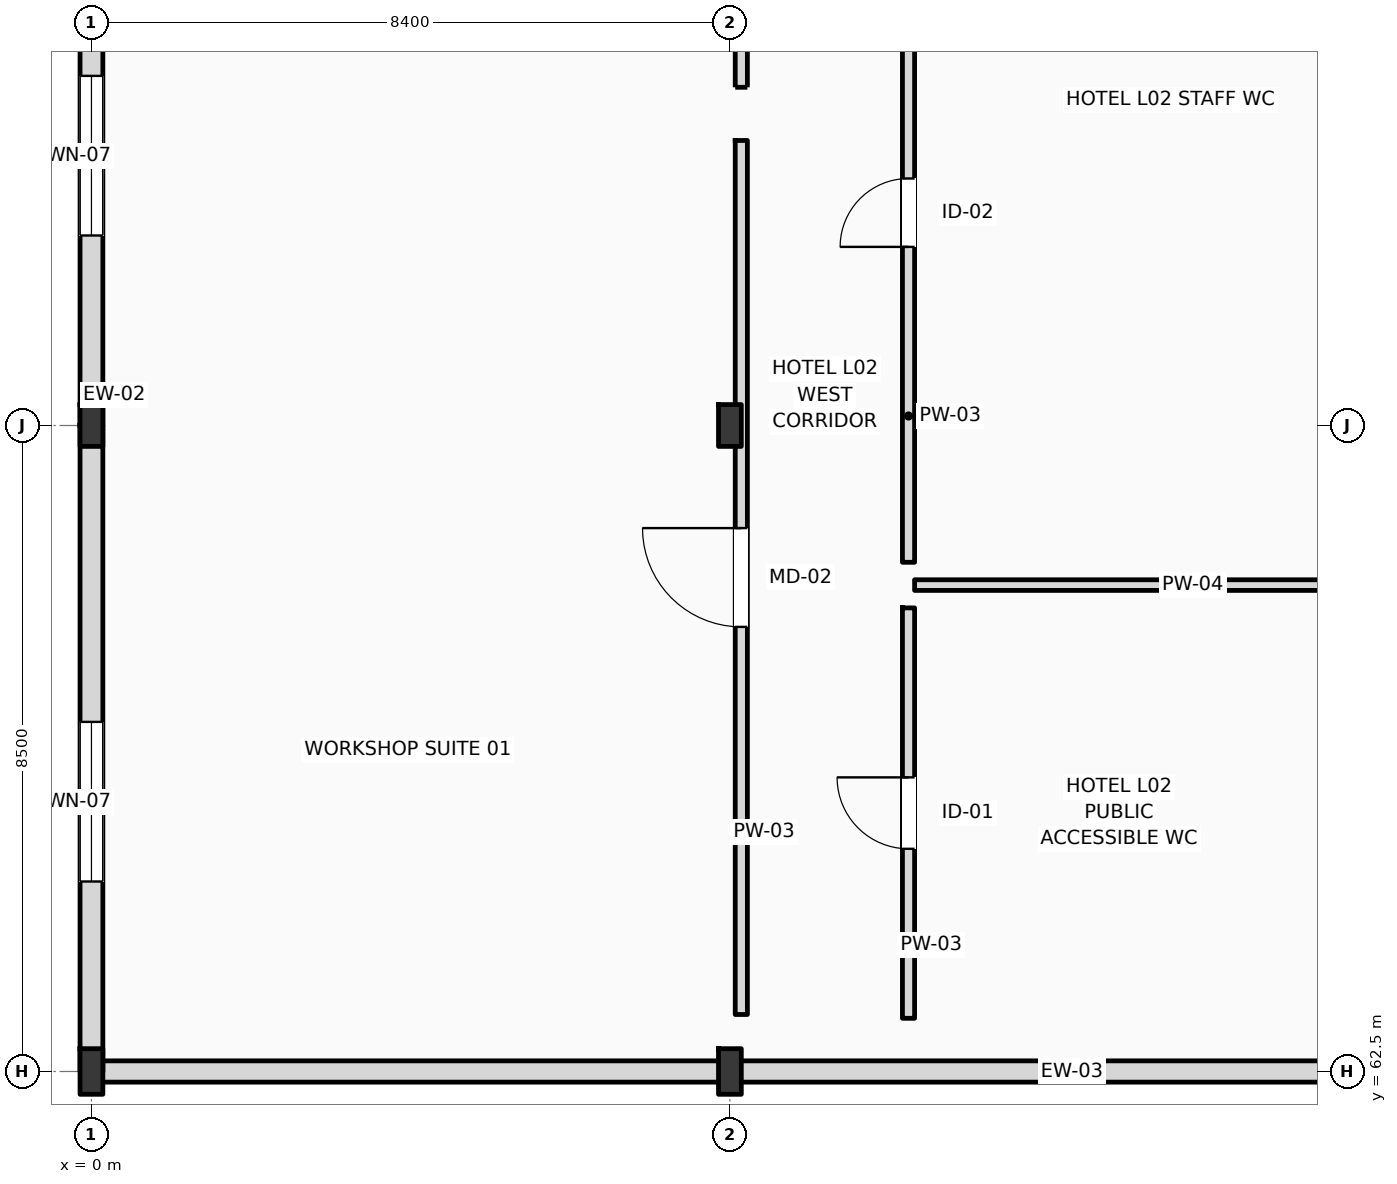
"""IFC4 building model, lengths in metres.
Left out: names, types, materials, properties, quantities, classifications, styles, units other than length and angle.
Written with IfcOpenShell. Run it as: python <this file> out.ifc"""

import sys

from ifc_helpers import new_model, si_unit, direction, frame, frame_2d, origin, origin_2d, place, context, subcontext, project, spatial, rectangle, i_section, extrude, element, fill, save


model = new_model("IFC4")
c1 = context("Model", 3, precision=1e-05, world=origin(), true_north=direction((0.0, 1.0)))
c2 = subcontext(c1, "Body", "Model", "MODEL_VIEW")
j1 = project(units=[si_unit("LENGTHUNIT", "METRE"), si_unit("PLANEANGLEUNIT", "RADIAN")], contexts=[c1])
p1 = place(None, origin())
s1 = spatial("IfcSite", under=j1, at=p1, CompositionType="ELEMENT")
p2 = place(p1, origin())
s2 = spatial("IfcBuilding", under=s1, at=p2, CompositionType="ELEMENT")
p3 = place(p2, frame((0.0, 0.0, 11.4)))
s3 = spatial("IfcBuildingStorey", under=s2, at=p3, CompositionType="ELEMENT", Elevation=11.4)
p4 = place(p3, frame((0.0, 62.5, 0.0), z_axis=(0.0, 0.0, 1.0), x_axis=(1.0, 0.0, 0.0)))
e1 = element("IfcColumn", 1, at=p4, inside=s3, PredefinedType="COLUMN", context=c2, shape_type="SweptSolid", body=[
    extrude(i_section(OverallWidth=0.3, OverallDepth=0.6, WebThickness=0.015, FlangeThickness=0.03, FilletRadius=0.027, at=origin_2d()), origin(), (0.0, 0.0, 1.0), 4.8),
])
p5 = place(p3, frame((0.0, 71.0, 0.0), z_axis=(0.0, 0.0, 1.0), x_axis=(1.0, 0.0, 0.0)))
e2 = element("IfcColumn", 2, at=p5, inside=s3, PredefinedType="COLUMN", context=c2, shape_type="SweptSolid", body=[
    extrude(i_section(OverallWidth=0.3, OverallDepth=0.55, WebThickness=0.015, FlangeThickness=0.029, FilletRadius=0.027, at=origin_2d()), origin(), (0.0, 0.0, 1.0), 4.8),
])
p6 = place(p3, frame((8.4, 62.5, 0.0), z_axis=(0.0, 0.0, 1.0), x_axis=(1.0, 0.0, 0.0)))
e3 = element("IfcColumn", 3, at=p6, inside=s3, PredefinedType="COLUMN", context=c2, shape_type="SweptSolid", body=[
    extrude(i_section(OverallWidth=0.3, OverallDepth=0.6, WebThickness=0.015, FlangeThickness=0.03, FilletRadius=0.027, at=origin_2d()), origin(), (0.0, 0.0, 1.0), 4.8),
])
p7 = place(p3, frame((8.4, 71.0, 0.0), z_axis=(0.0, 0.0, 1.0), x_axis=(1.0, 0.0, 0.0)))
e4 = element("IfcColumn", 4, at=p7, inside=s3, PredefinedType="COLUMN", context=c2, shape_type="SweptSolid", body=[
    extrude(i_section(OverallWidth=0.3, OverallDepth=0.55, WebThickness=0.015, FlangeThickness=0.029, FilletRadius=0.027, at=origin_2d()), origin(), (0.0, 0.0, 1.0), 4.8),
])
p8 = place(p3, frame((0.0, 62.5, 0.0), z_axis=(0.0, 0.0, 1.0), x_axis=(0.0, 1.0, 0.0)))
e5 = element("IfcWall", 5, at=p8, inside=s3, PredefinedType="STANDARD", context=c2, shape_type="SweptSolid", body=[
    extrude(rectangle(XDim=8.5, YDim=0.3, at=frame_2d((4.25, 0.0))), origin(), (0.0, 0.0, 1.0), 4.11),
])
p9 = place(p8, frame((2.5, 0.0, 0.95)))
e6 = element("IfcOpeningElement", 6, at=p9, cuts=e5, PredefinedType="OPENING", context=c2, shape_type="SweptSolid", body=[
    extrude(rectangle(XDim=2.1, YDim=2.2, at=frame_2d((1.05, 1.1))), frame((0.0, 0.16, 0.0), z_axis=(0.0, -1.0, 0.0), x_axis=(1.0, 0.0, 0.0)), (0.0, 0.0, 1.0), 0.32),
])
p10 = place(p3, frame((0.0, 71.0, 0.0), z_axis=(0.0, 0.0, 1.0), x_axis=(0.0, 1.0, 0.0)))
e7 = element("IfcWall", 7, at=p10, inside=s3, PredefinedType="STANDARD", context=c2, shape_type="SweptSolid", body=[
    extrude(rectangle(XDim=8.5, YDim=0.3, at=frame_2d((4.25, 0.0))), origin(), (0.0, 0.0, 1.0), 4.11),
])
p11 = place(p10, frame((2.5, 0.0, 0.95)))
e8 = element("IfcOpeningElement", 8, at=p11, cuts=e7, PredefinedType="OPENING", context=c2, shape_type="SweptSolid", body=[
    extrude(rectangle(XDim=2.1, YDim=2.2, at=frame_2d((1.05, 1.1))), frame((0.0, 0.16, 0.0), z_axis=(0.0, -1.0, 0.0), x_axis=(1.0, 0.0, 0.0)), (0.0, 0.0, 1.0), 0.32),
])
p12 = place(p3, frame((0.0, 62.5, 0.0), z_axis=(0.0, 0.0, 1.0), x_axis=(1.0, 0.0, 0.0)))
e9 = element("IfcWall", 9, at=p12, inside=s3, PredefinedType="STANDARD", context=c2, shape_type="SweptSolid", body=[
    extrude(rectangle(XDim=25.2, YDim=0.28, at=frame_2d((12.6, 0.0))), origin(), (0.0, 0.0, 1.0), 3.96),
])
p13 = place(p3, frame((8.55, 63.25, 0.0), z_axis=(0.0, 0.0, 1.0), x_axis=(0.0, 1.0, 0.0)))
e10 = element("IfcWall", 10, at=p13, inside=s3, PredefinedType="PARTITIONING", context=c2, shape_type="SweptSolid", body=[
    extrude(rectangle(XDim=11.5, YDim=0.16, at=frame_2d((5.75, 0.0))), origin(), (0.0, 0.0, 1.0), 4.11),
])
p14 = place(p13, frame((5.1, 0.0, 0.0)))
e11 = element("IfcOpeningElement", 11, at=p14, cuts=e10, PredefinedType="OPENING", context=c2, shape_type="SweptSolid", body=[
    extrude(rectangle(XDim=1.3, YDim=2.2, at=frame_2d((0.65, 1.1))), frame((0.0, 0.09, 0.0), z_axis=(0.0, -1.0, 0.0), x_axis=(1.0, 0.0, 0.0)), (0.0, 0.0, 1.0), 0.18),
])
p15 = place(p3, frame((8.55, 75.45, 0.0), z_axis=(0.0, 0.0, 1.0), x_axis=(0.0, 1.0, 0.0)))
e12 = element("IfcWall", 12, at=p15, inside=s3, PredefinedType="PARTITIONING", context=c2, shape_type="SweptSolid", body=[
    extrude(rectangle(XDim=19.5, YDim=0.16, at=frame_2d((9.75, 0.0))), origin(), (0.0, 0.0, 1.0), 4.11),
])
p16 = place(p15, frame((9.1, 0.0, 0.0)))
e13 = element("IfcOpeningElement", 13, at=p16, cuts=e12, PredefinedType="OPENING", context=c2, shape_type="SweptSolid", body=[
    extrude(rectangle(XDim=1.3, YDim=2.2, at=frame_2d((0.65, 1.1))), frame((0.0, 0.09, 0.0), z_axis=(0.0, -1.0, 0.0), x_axis=(1.0, 0.0, 0.0)), (0.0, 0.0, 1.0), 0.18),
])
p17 = place(p3, frame((10.75, 63.2, 0.0), z_axis=(0.0, 0.0, 1.0), x_axis=(0.0, 1.0, 0.0)))
e14 = element("IfcWall", 14, at=p17, inside=s3, PredefinedType="PARTITIONING", context=c2, shape_type="SweptSolid", body=[
    extrude(rectangle(XDim=5.4, YDim=0.16, at=frame_2d((2.7, 0.0))), origin(), (0.0, 0.0, 1.0), 4.52),
])
p18 = place(p17, frame((2.23, 0.0, 0.0)))
e15 = element("IfcOpeningElement", 15, at=p18, cuts=e14, PredefinedType="OPENING", context=c2, shape_type="SweptSolid", body=[
    extrude(rectangle(XDim=0.94, YDim=2.15, at=frame_2d((0.47, 1.075))), frame((0.0, 0.09, 0.0), z_axis=(0.0, -1.0, 0.0), x_axis=(1.0, 0.0, 0.0)), (0.0, 0.0, 1.0), 0.18),
])
p19 = place(p3, frame((10.75, 69.2, 0.0), z_axis=(0.0, 0.0, 1.0), x_axis=(0.0, 1.0, 0.0)))
e16 = element("IfcWall", 16, at=p19, inside=s3, PredefinedType="PARTITIONING", context=c2, shape_type="SweptSolid", body=[
    extrude(rectangle(XDim=9.2, YDim=0.16, at=frame_2d((4.6, 0.0))), origin(), (0.0, 0.0, 1.0), 4.52),
])
p20 = place(p19, frame((4.15, 0.0, 0.0)))
e17 = element("IfcOpeningElement", 17, at=p20, cuts=e16, PredefinedType="OPENING", context=c2, shape_type="SweptSolid", body=[
    extrude(rectangle(XDim=0.9, YDim=2.1, at=frame_2d((0.45, 1.05))), frame((0.0, 0.09, 0.0), z_axis=(0.0, -1.0, 0.0), x_axis=(1.0, 0.0, 0.0)), (0.0, 0.0, 1.0), 0.18),
])
p21 = place(p3, frame((10.83, 68.9, 0.0), z_axis=(0.0, 0.0, 1.0), x_axis=(1.0, 0.0, 0.0)))
e18 = element("IfcWall", 18, at=p21, inside=s3, PredefinedType="PARTITIONING", context=c2, shape_type="SweptSolid", body=[
    extrude(rectangle(XDim=6.72, YDim=0.14, at=frame_2d((3.36, 0.0))), origin(), (0.0, 0.0, 1.0), 4.52),
])
p22 = place(p9, origin())
e19 = element("IfcWindow", 19, at=p22, inside=s3, PartitioningType="DOUBLE_PANEL_VERTICAL", PredefinedType="WINDOW", context=c2, shape_type="SweptSolid", body=[
    extrude(rectangle(XDim=2.1, YDim=2.2, at=frame_2d((1.05, 1.1))), frame((0.0, 0.03, 0.0), z_axis=(0.0, -1.0, 0.0), x_axis=(1.0, 0.0, 0.0)), (0.0, 0.0, 1.0), 0.06),
])
fill(e6, e19)
p23 = place(p11, origin())
e20 = element("IfcWindow", 20, at=p23, inside=s3, PartitioningType="DOUBLE_PANEL_VERTICAL", PredefinedType="WINDOW", context=c2, shape_type="SweptSolid", body=[
    extrude(rectangle(XDim=2.1, YDim=2.2, at=frame_2d((1.05, 1.1))), frame((0.0, 0.03, 0.0), z_axis=(0.0, -1.0, 0.0), x_axis=(1.0, 0.0, 0.0)), (0.0, 0.0, 1.0), 0.06),
])
fill(e8, e20)
p24 = place(p14, origin())
e21 = element("IfcDoor", 21, at=p24, inside=s3, OperationType="SINGLE_SWING_RIGHT", PredefinedType="DOOR", context=c2, shape_type="SweptSolid", body=[
    extrude(rectangle(XDim=1.3, YDim=2.2, at=frame_2d((0.65, 1.1))), frame((0.0, 0.025, 0.0), z_axis=(0.0, -1.0, 0.0), x_axis=(1.0, 0.0, 0.0)), (0.0, 0.0, 1.0), 0.05),
])
fill(e11, e21)
p25 = place(p18, origin())
e22 = element("IfcDoor", 22, at=p25, inside=s3, OperationType="SINGLE_SWING_RIGHT", PredefinedType="DOOR", context=c2, shape_type="SweptSolid", body=[
    extrude(rectangle(XDim=0.94, YDim=2.15, at=frame_2d((0.47, 1.075))), frame((0.0, 0.025, 0.0), z_axis=(0.0, -1.0, 0.0), x_axis=(1.0, 0.0, 0.0)), (0.0, 0.0, 1.0), 0.05),
])
fill(e15, e22)
p26 = place(p20, origin())
e23 = element("IfcDoor", 23, at=p26, inside=s3, OperationType="SINGLE_SWING_LEFT", PredefinedType="DOOR", context=c2, shape_type="SweptSolid", body=[
    extrude(rectangle(XDim=0.9, YDim=2.1, at=frame_2d((0.45, 1.05))), frame((0.0, 0.025, 0.0), z_axis=(0.0, -1.0, 0.0), x_axis=(1.0, 0.0, 0.0)), (0.0, 0.0, 1.0), 0.05),
])
fill(e17, e23)
save(model, sys.argv[1])
